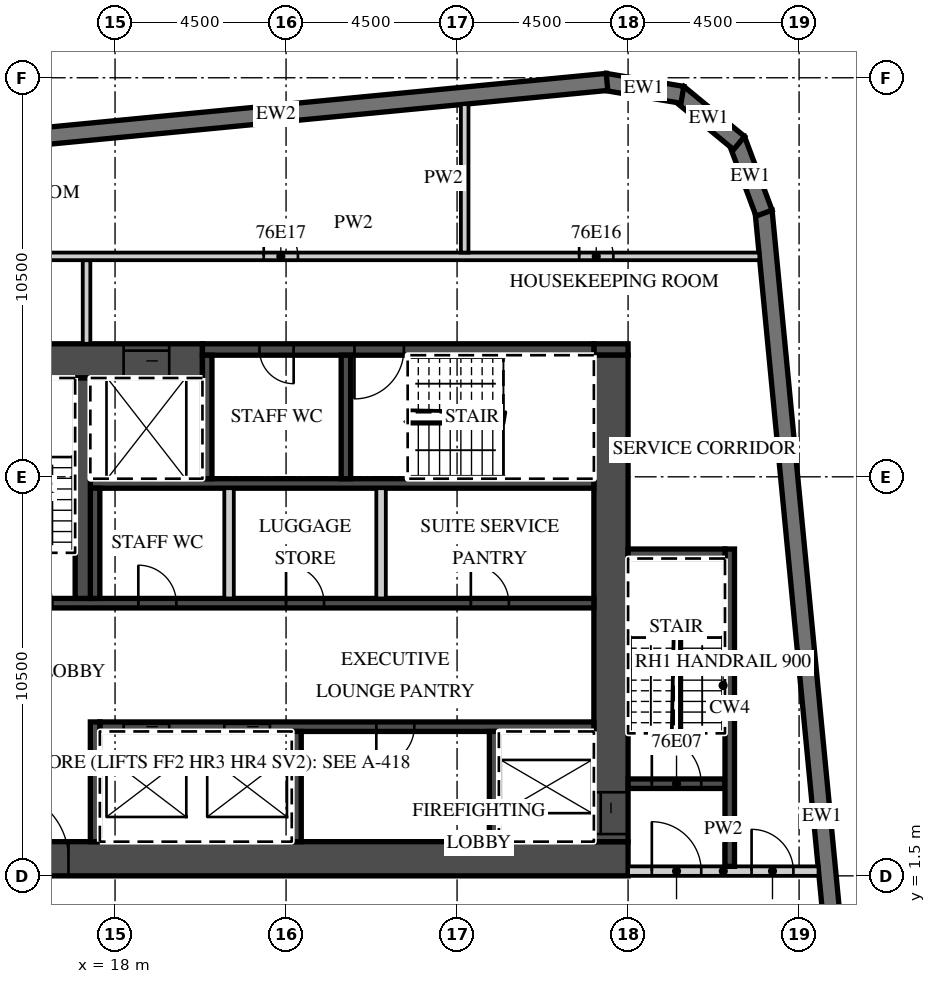
"""IFC4 building model, lengths in metres.
Left out: names, types, materials, properties, quantities, classifications, styles, units other than length and angle.
Written with IfcOpenShell. Run it as: python <this file> out.ifc"""

import sys

from ifc_helpers import new_model, si_unit, direction, frame, frame_2d, origin, place, context, subcontext, project, spatial, polyline, rectangle, outline, extrude, element, fill, save


model = new_model("IFC4")
c1 = context("Model", 3, precision=1e-05, world=origin(), true_north=direction((0.0, 1.0)))
c2 = subcontext(c1, "Body", "Model", "MODEL_VIEW")
j1 = project(units=[si_unit("LENGTHUNIT", "METRE"), si_unit("PLANEANGLEUNIT", "RADIAN")], contexts=[c1])
p1 = place(None, origin())
s1 = spatial("IfcSite", under=j1, at=p1, CompositionType="ELEMENT")
p2 = place(p1, origin())
s2 = spatial("IfcBuilding", under=s1, at=p2, CompositionType="ELEMENT")
p3 = place(p2, frame((0.0, 0.0, 301.5)))
s3 = spatial("IfcBuildingStorey", under=s2, at=p3, CompositionType="ELEMENT", Elevation=301.5)
p4 = place(p3, frame((38.132, -12.858, 0.0), z_axis=(0.0, 0.0, 1.0), x_axis=(-0.095847749461, 0.995396006082, 0.0)))
e1 = element("IfcWall", 1, at=p4, inside=s3, PredefinedType="SOLIDWALL", context=c2, shape_type="SweptSolid", body=[
    extrude(rectangle(XDim=32.0, YDim=0.45, at=frame_2d((16.0, 0.0))), origin(), (0.0, 0.0, 1.0), 3.02),
])
p5 = place(p3, frame((35.078, 18.938, 0.0), z_axis=(0.0, 0.0, 1.0), x_axis=(-0.350192909346, 0.936677599948, 0.0)))
e2 = element("IfcWall", 2, at=p5, inside=s3, PredefinedType="SOLIDWALL", context=c2, shape_type="SweptSolid", body=[
    extrude(outline(polyline([(0.0, -0.225), (2.071, -0.225), (1.95, 0.225), (0.121, 0.225), (0.0, -0.225)])), origin(), (0.0, 0.0, 1.0), 3.02),
])
p6 = place(p3, frame((34.421, 20.782, 0.0), z_axis=(0.0, 0.0, 1.0), x_axis=(-0.771593176315, 0.636116318187, 0.0)))
e3 = element("IfcWall", 3, at=p6, inside=s3, PredefinedType="SOLIDWALL", context=c2, shape_type="SweptSolid", body=[
    extrude(outline(polyline([(0.0, -0.225), (2.071, -0.225), (1.95, 0.225), (0.12, 0.225), (0.0, -0.225)])), origin(), (0.0, 0.0, 1.0), 3.02),
])
p7 = place(p3, frame((32.929, 22.051, 0.0), z_axis=(0.0, 0.0, 1.0), x_axis=(-0.986298144721, 0.164972633245, 0.0)))
e4 = element("IfcWall", 4, at=p7, inside=s3, PredefinedType="SOLIDWALL", context=c2, shape_type="SweptSolid", body=[
    extrude(outline(polyline([(0.0, -0.225), (2.07, -0.225), (1.95, 0.225), (0.121, 0.225), (0.0, -0.225)])), origin(), (0.0, 0.0, 1.0), 3.02),
])
p8 = place(p3, frame((30.946, 22.391, 0.0), z_axis=(0.0, 0.0, 1.0), x_axis=(-0.995396397117, -0.095843688398, 0.0)))
e5 = element("IfcWall", 5, at=p8, inside=s3, PredefinedType="SOLIDWALL", context=c2, shape_type="SweptSolid", body=[
    extrude(rectangle(XDim=17.505, YDim=0.45, at=frame_2d((8.752, 0.0))), origin(), (0.0, 0.0, 1.0), 3.02),
])
p9 = place(p3, frame((13.5, 1.95, 0.0), z_axis=(0.0, 0.0, 1.0), x_axis=(1.0, 0.0, 0.0)))
e6 = element("IfcWall", 6, at=p9, inside=s3, PredefinedType="SHEAR", context=c2, shape_type="SweptSolid", body=[
    extrude(rectangle(XDim=18.0, YDim=0.9, at=frame_2d((9.0, 0.0))), origin(), (0.0, 0.0, 1.0), 3.02),
])
p10 = place(p9, frame((1.475, 0.0, 0.0)))
e7 = element("IfcOpeningElement", 7, at=p10, cuts=e6, PredefinedType="OPENING", context=c2, shape_type="SweptSolid", body=[
    extrude(rectangle(XDim=1.8, YDim=2.1, at=frame_2d((0.9, 1.05))), frame((0.0, 0.46, 0.0), z_axis=(0.0, -1.0, 0.0), x_axis=(1.0, 0.0, 0.0)), (0.0, 0.0, 1.0), 0.92),
])
p11 = place(p3, frame((13.5, 15.05, 0.0), z_axis=(0.0, 0.0, 1.0), x_axis=(1.0, 0.0, 0.0)))
e8 = element("IfcWall", 8, at=p11, inside=s3, PredefinedType="SHEAR", context=c2, shape_type="SweptSolid", body=[
    extrude(rectangle(XDim=6.8, YDim=0.9, at=frame_2d((3.4, 0.0))), origin(), (0.0, 0.0, 1.0), 3.02),
])
p12 = place(p11, frame((4.725, 0.0, 0.0)))
e9 = element("IfcOpeningElement", 9, at=p12, cuts=e8, PredefinedType="OPENING", context=c2, shape_type="SweptSolid", body=[
    extrude(rectangle(XDim=1.2, YDim=2.1, at=frame_2d((0.6, 1.05))), frame((0.0, 0.46, 0.0), z_axis=(0.0, -1.0, 0.0), x_axis=(1.0, 0.0, 0.0)), (0.0, 0.0, 1.0), 0.92),
])
p13 = place(p3, frame((30.6, 15.35, 0.0), z_axis=(0.0, 0.0, 1.0), x_axis=(1.0, 0.0, 0.0)))
e10 = element("IfcWall", 10, at=p13, inside=s3, PredefinedType="SHEAR", context=c2, shape_type="SweptSolid", body=[
    extrude(rectangle(XDim=0.9, YDim=0.3, at=frame_2d((0.45, 0.0))), origin(), (0.0, 0.0, 1.0), 3.02),
])
p14 = place(p3, frame((20.3, 15.35, 0.0), z_axis=(0.0, 0.0, 1.0), x_axis=(1.0, 0.0, 0.0)))
e11 = element("IfcWall", 11, at=p14, inside=s3, PredefinedType="SHEAR", context=c2, shape_type="SweptSolid", body=[
    extrude(rectangle(XDim=10.3, YDim=0.3, at=frame_2d((5.15, 0.0))), origin(), (0.0, 0.0, 1.0), 3.02),
])
p15 = place(p14, frame((4.0, 0.0, 0.0)))
e12 = element("IfcOpeningElement", 12, at=p15, cuts=e11, PredefinedType="OPENING", context=c2, shape_type="SweptSolid", body=[
    extrude(rectangle(XDim=1.3, YDim=2.1, at=frame_2d((0.65, 1.05))), frame((0.0, 0.16, 0.0), z_axis=(0.0, -1.0, 0.0), x_axis=(1.0, 0.0, 0.0)), (0.0, 0.0, 1.0), 0.32),
])
p16 = place(p14, frame((1.5, 0.0, 0.0)))
e13 = element("IfcOpeningElement", 13, at=p16, cuts=e11, PredefinedType="OPENING", context=c2, shape_type="SweptSolid", body=[
    extrude(rectangle(XDim=0.9, YDim=2.1, at=frame_2d((0.45, 1.05))), frame((0.0, 0.16, 0.0), z_axis=(0.0, -1.0, 0.0), x_axis=(1.0, 0.0, 0.0)), (0.0, 0.0, 1.0), 0.32),
])
p17 = place(p3, frame((31.05, 2.4, 0.0), z_axis=(0.0, 0.0, 1.0), x_axis=(0.0, 1.0, 0.0)))
e14 = element("IfcWall", 14, at=p17, inside=s3, PredefinedType="SHEAR", context=c2, shape_type="SweptSolid", body=[
    extrude(rectangle(XDim=12.8, YDim=0.9, at=frame_2d((6.4, 0.0))), origin(), (0.0, 0.0, 1.0), 3.02),
])
p18 = place(p17, frame((0.2, 0.0, 0.0)))
e15 = element("IfcOpeningElement", 15, at=p18, cuts=e14, PredefinedType="OPENING", context=c2, shape_type="SweptSolid", body=[
    extrude(rectangle(XDim=1.1, YDim=2.1, at=frame_2d((0.55, 1.05))), frame((0.0, 0.46, 0.0), z_axis=(0.0, -1.0, 0.0), x_axis=(1.0, 0.0, 0.0)), (0.0, 0.0, 1.0), 0.92),
])
p19 = place(p3, frame((17.6, 5.425, 0.0), z_axis=(0.0, 0.0, 1.0), x_axis=(1.0, 0.0, 0.0)))
e16 = element("IfcWall", 16, at=p19, inside=s3, PredefinedType="SHEAR", context=c2, shape_type="SweptSolid", body=[
    extrude(rectangle(XDim=13.0, YDim=0.25, at=frame_2d((6.5, 0.0))), origin(), (0.0, 0.0, 1.0), 3.02),
])
p20 = place(p19, frame((3.275, 0.0, 0.0)))
e17 = element("IfcOpeningElement", 17, at=p20, cuts=e16, PredefinedType="OPENING", context=c2, shape_type="SweptSolid", body=[
    extrude(rectangle(XDim=1.2, YDim=2.1, at=frame_2d((0.6, 1.05))), frame((0.0, 0.135, 0.0), z_axis=(0.0, -1.0, 0.0), x_axis=(1.0, 0.0, 0.0)), (0.0, 0.0, 1.0), 0.27),
])
p21 = place(p19, frame((0.625, 0.0, 0.0)))
e18 = element("IfcOpeningElement", 18, at=p21, cuts=e16, PredefinedType="OPENING", context=c2, shape_type="SweptSolid", body=[
    extrude(rectangle(XDim=1.2, YDim=2.1, at=frame_2d((0.6, 1.05))), frame((0.0, 0.135, 0.0), z_axis=(0.0, -1.0, 0.0), x_axis=(1.0, 0.0, 0.0)), (0.0, 0.0, 1.0), 0.27),
])
p22 = place(p19, frame((7.275, 0.0, 0.0)))
e19 = element("IfcOpeningElement", 19, at=p22, cuts=e16, PredefinedType="OPENING", context=c2, shape_type="SweptSolid", body=[
    extrude(rectangle(XDim=1.0, YDim=2.1, at=frame_2d((0.5, 1.05))), frame((0.0, 0.135, 0.0), z_axis=(0.0, -1.0, 0.0), x_axis=(1.0, 0.0, 0.0)), (0.0, 0.0, 1.0), 0.27),
])
p23 = place(p3, frame((17.475, 2.4, 0.0), z_axis=(0.0, 0.0, 1.0), x_axis=(0.0, 1.0, 0.0)))
e20 = element("IfcWall", 20, at=p23, inside=s3, PredefinedType="SHEAR", context=c2, shape_type="SweptSolid", body=[
    extrude(rectangle(XDim=3.15, YDim=0.25, at=frame_2d((1.575, 0.0))), origin(), (0.0, 0.0, 1.0), 3.02),
])
for number, where, z_axis, x_axis in (
    (21, (27.975, 2.4, 0.0), (0.0, 0.0, 1.0), (0.0, 1.0, 0.0)),
    (22, (22.775, 2.4, 0.0), (0.0, 0.0, 1.0), (0.0, 1.0, 0.0)),
):
    element("IfcWall", number, at=place(p3, frame(where, z_axis=z_axis, x_axis=x_axis)), inside=s3, PredefinedType="SHEAR", context=c2, shape_type="SweptSolid", body=[
        extrude(rectangle(XDim=2.9, YDim=0.25, at=frame_2d((1.45, 0.0))), origin(), (0.0, 0.0, 1.0), 3.02),
    ])
p24 = place(p3, frame((14.4, 8.675, 0.0), z_axis=(0.0, 0.0, 1.0), x_axis=(1.0, 0.0, 0.0)))
e23 = element("IfcWall", 23, at=p24, inside=s3, PredefinedType="SHEAR", context=c2, shape_type="SweptSolid", body=[
    extrude(rectangle(XDim=16.2, YDim=0.25, at=frame_2d((8.1, 0.0))), origin(), (0.0, 0.0, 1.0), 3.02),
])
p25 = place(p24, frame((0.65, 0.0, 0.0)))
e24 = element("IfcOpeningElement", 24, at=p25, cuts=e23, PredefinedType="OPENING", context=c2, shape_type="SweptSolid", body=[
    extrude(rectangle(XDim=1.3, YDim=2.1, at=frame_2d((0.65, 1.05))), frame((0.0, 0.135, 0.0), z_axis=(0.0, -1.0, 0.0), x_axis=(1.0, 0.0, 0.0)), (0.0, 0.0, 1.0), 0.27),
])
p26 = place(p24, frame((12.962, 0.0, 0.0)))
e25 = element("IfcOpeningElement", 25, at=p26, cuts=e23, PredefinedType="OPENING", context=c2, shape_type="SweptSolid", body=[
    extrude(rectangle(XDim=1.0, YDim=2.1, at=frame_2d((0.5, 1.05))), frame((0.0, 0.135, 0.0), z_axis=(0.0, -1.0, 0.0), x_axis=(1.0, 0.0, 0.0)), (0.0, 0.0, 1.0), 0.27),
])
p27 = place(p24, frame((8.1, 0.0, 0.0)))
e26 = element("IfcOpeningElement", 26, at=p27, cuts=e23, PredefinedType="OPENING", context=c2, shape_type="SweptSolid", body=[
    extrude(rectangle(XDim=1.0, YDim=2.1, at=frame_2d((0.5, 1.05))), frame((0.0, 0.135, 0.0), z_axis=(0.0, -1.0, 0.0), x_axis=(1.0, 0.0, 0.0)), (0.0, 0.0, 1.0), 0.27),
])
p28 = place(p24, frame((4.212, 0.0, 0.0)))
e27 = element("IfcOpeningElement", 27, at=p28, cuts=e23, PredefinedType="OPENING", context=c2, shape_type="SweptSolid", body=[
    extrude(rectangle(XDim=1.0, YDim=2.1, at=frame_2d((0.5, 1.05))), frame((0.0, 0.135, 0.0), z_axis=(0.0, -1.0, 0.0), x_axis=(1.0, 0.0, 0.0)), (0.0, 0.0, 1.0), 0.27),
])
p29 = place(p3, frame((17.35, 11.825, 0.0), z_axis=(0.0, 0.0, 1.0), x_axis=(1.0, 0.0, 0.0)))
e28 = element("IfcWall", 28, at=p29, inside=s3, PredefinedType="SHEAR", context=c2, shape_type="SweptSolid", body=[
    extrude(rectangle(XDim=13.25, YDim=0.25, at=frame_2d((6.625, 0.0))), origin(), (0.0, 0.0, 1.0), 3.02),
])
p30 = place(p3, frame((17.475, 8.8, 0.0), z_axis=(0.0, 0.0, 1.0), x_axis=(0.0, 1.0, 0.0)))
e29 = element("IfcWall", 29, at=p30, inside=s3, PredefinedType="SHEAR", context=c2, shape_type="SweptSolid", body=[
    extrude(rectangle(XDim=2.9, YDim=0.25, at=frame_2d((1.45, 0.0))), origin(), (0.0, 0.0, 1.0), 3.02),
])
for number, where, z_axis, x_axis in (
    (30, (25.0, 8.8, 0.0), (0.0, 0.0, 1.0), (0.0, 1.0, 0.0)),
    (31, (21.0, 8.8, 0.0), (0.0, 0.0, 1.0), (0.0, 1.0, 0.0)),
):
    element("IfcWall", number, at=place(p3, frame(where, z_axis=z_axis, x_axis=x_axis)), inside=s3, PredefinedType="PARTITIONING", context=c2, shape_type="SweptSolid", body=[
        extrude(rectangle(XDim=2.9, YDim=0.25, at=frame_2d((1.45, 0.0))), origin(), (0.0, 0.0, 1.0), 3.02),
    ])
p31 = place(p3, frame((17.15, 8.8, 0.0), z_axis=(0.0, 0.0, 1.0), x_axis=(0.0, 1.0, 0.0)))
e32 = element("IfcWall", 32, at=p31, inside=s3, PredefinedType="SHEAR", context=c2, shape_type="SweptSolid", body=[
    extrude(rectangle(XDim=5.8, YDim=0.4, at=frame_2d((2.9, 0.0))), origin(), (0.0, 0.0, 1.0), 3.02),
])
for number, where, z_axis, x_axis in (
    (33, (20.425, 11.95, 0.0), (0.0, 0.0, 1.0), (0.0, 1.0, 0.0)),
    (34, (24.075, 11.95, 0.0), (0.0, 0.0, 1.0), (0.0, 1.0, 0.0)),
):
    element("IfcWall", number, at=place(p3, frame(where, z_axis=z_axis, x_axis=x_axis)), inside=s3, PredefinedType="SHEAR", context=c2, shape_type="SweptSolid", body=[
        extrude(rectangle(XDim=3.25, YDim=0.25, at=frame_2d((1.625, 0.0))), origin(), (0.0, 0.0, 1.0), 3.02),
    ])
p32 = place(p3, frame((31.5, 1.625, 0.0), z_axis=(0.0, 0.0, 1.0), x_axis=(1.0, 0.0, 0.0)))
e35 = element("IfcWall", 35, at=p32, inside=s3, PredefinedType="PARTITIONING", context=c2, shape_type="SweptSolid", body=[
    extrude(rectangle(XDim=5.012, YDim=0.25, at=frame_2d((2.506, 0.0))), origin(), (0.0, 0.0, 1.0), 3.02),
])
p33 = place(p32, frame((0.625, 0.0, 0.0)))
e36 = element("IfcOpeningElement", 36, at=p33, cuts=e35, PredefinedType="OPENING", context=c2, shape_type="SweptSolid", body=[
    extrude(rectangle(XDim=1.3, YDim=2.1, at=frame_2d((0.65, 1.05))), frame((0.0, 0.135, 0.0), z_axis=(0.0, -1.0, 0.0), x_axis=(1.0, 0.0, 0.0)), (0.0, 0.0, 1.0), 0.27),
])
p34 = place(p32, frame((3.25, 0.0, 0.0)))
e37 = element("IfcOpeningElement", 37, at=p34, cuts=e35, PredefinedType="OPENING", context=c2, shape_type="SweptSolid", body=[
    extrude(rectangle(XDim=1.1, YDim=2.1, at=frame_2d((0.55, 1.05))), frame((0.0, 0.135, 0.0), z_axis=(0.0, -1.0, 0.0), x_axis=(1.0, 0.0, 0.0)), (0.0, 0.0, 1.0), 0.27),
])
p35 = place(p3, frame((31.5, 3.925, 0.0), z_axis=(0.0, 0.0, 1.0), x_axis=(1.0, 0.0, 0.0)))
e38 = element("IfcWall", 38, at=p35, inside=s3, PredefinedType="SHEAR", context=c2, shape_type="SweptSolid", body=[
    extrude(rectangle(XDim=2.55, YDim=0.25, at=frame_2d((1.275, 0.0))), origin(), (0.0, 0.0, 1.0), 3.02),
])
p36 = place(p35, frame((0.625, 0.0, 0.0)))
e39 = element("IfcOpeningElement", 39, at=p36, cuts=e38, PredefinedType="OPENING", context=c2, shape_type="SweptSolid", body=[
    extrude(rectangle(XDim=1.3, YDim=2.1, at=frame_2d((0.65, 1.05))), frame((0.0, 0.135, 0.0), z_axis=(0.0, -1.0, 0.0), x_axis=(1.0, 0.0, 0.0)), (0.0, 0.0, 1.0), 0.27),
])
p37 = place(p3, frame((34.175, 1.75, 0.0), z_axis=(0.0, 0.0, 1.0), x_axis=(0.0, 1.0, 0.0)))
e40 = element("IfcWall", 40, at=p37, inside=s3, PredefinedType="SHEAR", context=c2, shape_type="SweptSolid", body=[
    extrude(rectangle(XDim=8.35, YDim=0.25, at=frame_2d((4.175, 0.0))), origin(), (0.0, 0.0, 1.0), 3.02),
])
p38 = place(p3, frame((31.5, 9.975, 0.0), z_axis=(0.0, 0.0, 1.0), x_axis=(1.0, 0.0, 0.0)))
e41 = element("IfcWall", 41, at=p38, inside=s3, PredefinedType="SHEAR", context=c2, shape_type="SweptSolid", body=[
    extrude(rectangle(XDim=2.55, YDim=0.25, at=frame_2d((1.275, 0.0))), origin(), (0.0, 0.0, 1.0), 3.02),
])
p39 = place(p3, frame((17.25, 15.5, 0.0), z_axis=(0.0, 0.0, 1.0), x_axis=(0.0, 1.0, 0.0)))
e42 = element("IfcWall", 42, at=p39, inside=s3, PredefinedType="PARTITIONING", context=c2, shape_type="SweptSolid", body=[
    extrude(rectangle(XDim=2.2, YDim=0.2, at=frame_2d((1.1, 0.0))), origin(), (0.0, 0.0, 1.0), 3.02),
])
p40 = place(p3, frame((13.6, 17.8, 0.0), z_axis=(0.0, 0.0, 1.0), x_axis=(1.0, 0.0, 0.0)))
e43 = element("IfcWall", 43, at=p40, inside=s3, PredefinedType="PARTITIONING", context=c2, shape_type="SweptSolid", body=[
    extrude(rectangle(XDim=21.354, YDim=0.2, at=frame_2d((10.677, 0.0))), origin(), (0.0, 0.0, 1.0), 3.02),
])
p41 = place(p40, frame((16.613, 0.0, 0.0)))
e44 = element("IfcOpeningElement", 44, at=p41, cuts=e43, PredefinedType="OPENING", context=c2, shape_type="SweptSolid", body=[
    extrude(rectangle(XDim=0.9, YDim=2.1, at=frame_2d((0.45, 1.05))), frame((0.0, 0.11, 0.0), z_axis=(0.0, -1.0, 0.0), x_axis=(1.0, 0.0, 0.0)), (0.0, 0.0, 1.0), 0.22),
])
p42 = place(p40, frame((8.312, 0.0, 0.0)))
e45 = element("IfcOpeningElement", 45, at=p42, cuts=e43, PredefinedType="OPENING", context=c2, shape_type="SweptSolid", body=[
    extrude(rectangle(XDim=0.9, YDim=2.1, at=frame_2d((0.45, 1.05))), frame((0.0, 0.11, 0.0), z_axis=(0.0, -1.0, 0.0), x_axis=(1.0, 0.0, 0.0)), (0.0, 0.0, 1.0), 0.22),
])
p43 = place(p3, frame((27.2, 17.9, 0.0), z_axis=(0.0, 0.0, 1.0), x_axis=(0.0, 1.0, 0.0)))
e46 = element("IfcWall", 46, at=p43, inside=s3, PredefinedType="PARTITIONING", context=c2, shape_type="SweptSolid", body=[
    extrude(rectangle(XDim=3.905, YDim=0.2, at=frame_2d((1.953, 0.0))), origin(), (0.0, 0.0, 1.0), 3.02),
])
p44 = place(p20, origin())
e47 = element("IfcDoor", 47, at=p44, inside=s3, OperationType="SLIDING_TO_RIGHT", PredefinedType="DOOR", context=c2, shape_type="SweptSolid", body=[
    extrude(rectangle(XDim=1.2, YDim=2.1, at=frame_2d((0.6, 1.05))), frame((0.0, 0.025, 0.0), z_axis=(0.0, -1.0, 0.0), x_axis=(1.0, 0.0, 0.0)), (0.0, 0.0, 1.0), 0.05),
])
fill(e17, e47)
p45 = place(p21, origin())
e48 = element("IfcDoor", 48, at=p45, inside=s3, OperationType="SLIDING_TO_LEFT", PredefinedType="DOOR", context=c2, shape_type="SweptSolid", body=[
    extrude(rectangle(XDim=1.2, YDim=2.1, at=frame_2d((0.6, 1.05))), frame((0.0, 0.025, 0.0), z_axis=(0.0, -1.0, 0.0), x_axis=(1.0, 0.0, 0.0)), (0.0, 0.0, 1.0), 0.05),
])
fill(e18, e48)
p46 = place(p12, origin())
e49 = element("IfcDoor", 49, at=p46, inside=s3, OperationType="SLIDING_TO_LEFT", PredefinedType="DOOR", context=c2, shape_type="SweptSolid", body=[
    extrude(rectangle(XDim=1.2, YDim=2.1, at=frame_2d((0.6, 1.05))), frame((0.0, 0.025, 0.0), z_axis=(0.0, -1.0, 0.0), x_axis=(1.0, 0.0, 0.0)), (0.0, 0.0, 1.0), 0.05),
])
fill(e9, e49)
p47 = place(p18, origin())
e50 = element("IfcDoor", 50, at=p47, inside=s3, OperationType="SLIDING_TO_LEFT", PredefinedType="DOOR", context=c2, shape_type="SweptSolid", body=[
    extrude(rectangle(XDim=1.1, YDim=2.1, at=frame_2d((0.55, 1.05))), frame((0.0, 0.025, 0.0), z_axis=(0.0, -1.0, 0.0), x_axis=(1.0, 0.0, 0.0)), (0.0, 0.0, 1.0), 0.05),
])
fill(e15, e50)
p48 = place(p10, origin())
e51 = element("IfcDoor", 51, at=p48, inside=s3, OperationType="DOUBLE_DOOR_DOUBLE_SWING", PredefinedType="DOOR", context=c2, shape_type="SweptSolid", body=[
    extrude(rectangle(XDim=1.8, YDim=2.1, at=frame_2d((0.9, 1.05))), frame((0.0, 0.025, 0.0), z_axis=(0.0, -1.0, 0.0), x_axis=(1.0, 0.0, 0.0)), (0.0, 0.0, 1.0), 0.05),
])
fill(e7, e51)
p49 = place(p33, origin())
e52 = element("IfcDoor", 52, at=p49, inside=s3, OperationType="SINGLE_SWING_LEFT", PredefinedType="DOOR", context=c2, shape_type="SweptSolid", body=[
    extrude(rectangle(XDim=1.3, YDim=2.1, at=frame_2d((0.65, 1.05))), frame((0.0, 0.025, 0.0), z_axis=(0.0, -1.0, 0.0), x_axis=(1.0, 0.0, 0.0)), (0.0, 0.0, 1.0), 0.05),
])
fill(e36, e52)
p50 = place(p36, origin())
e53 = element("IfcDoor", 53, at=p50, inside=s3, OperationType="SINGLE_SWING_LEFT", PredefinedType="DOOR", context=c2, shape_type="SweptSolid", body=[
    extrude(rectangle(XDim=1.3, YDim=2.1, at=frame_2d((0.65, 1.05))), frame((0.0, 0.025, 0.0), z_axis=(0.0, -1.0, 0.0), x_axis=(1.0, 0.0, 0.0)), (0.0, 0.0, 1.0), 0.05),
])
fill(e39, e53)
p51 = place(p34, origin())
e54 = element("IfcDoor", 54, at=p51, inside=s3, OperationType="SINGLE_SWING_LEFT", PredefinedType="DOOR", context=c2, shape_type="SweptSolid", body=[
    extrude(rectangle(XDim=1.1, YDim=2.1, at=frame_2d((0.55, 1.05))), frame((0.0, 0.025, 0.0), z_axis=(0.0, -1.0, 0.0), x_axis=(1.0, 0.0, 0.0)), (0.0, 0.0, 1.0), 0.05),
])
fill(e37, e54)
p52 = place(p15, origin())
e55 = element("IfcDoor", 55, at=p52, inside=s3, OperationType="SINGLE_SWING_LEFT", PredefinedType="DOOR", context=c2, shape_type="SweptSolid", body=[
    extrude(rectangle(XDim=1.3, YDim=2.1, at=frame_2d((0.65, 1.05))), frame((0.0, 0.025, 0.0), z_axis=(0.0, -1.0, 0.0), x_axis=(1.0, 0.0, 0.0)), (0.0, 0.0, 1.0), 0.05),
])
fill(e12, e55)
p53 = place(p16, origin())
e56 = element("IfcDoor", 56, at=p53, inside=s3, OperationType="SINGLE_SWING_RIGHT", PredefinedType="DOOR", context=c2, shape_type="SweptSolid", body=[
    extrude(rectangle(XDim=0.9, YDim=2.1, at=frame_2d((0.45, 1.05))), frame((0.0, 0.025, 0.0), z_axis=(0.0, -1.0, 0.0), x_axis=(1.0, 0.0, 0.0)), (0.0, 0.0, 1.0), 0.05),
])
fill(e13, e56)
p54 = place(p26, origin())
e57 = element("IfcDoor", 57, at=p54, inside=s3, OperationType="SINGLE_SWING_LEFT", PredefinedType="DOOR", context=c2, shape_type="SweptSolid", body=[
    extrude(rectangle(XDim=1.0, YDim=2.1, at=frame_2d((0.5, 1.05))), frame((0.0, 0.025, 0.0), z_axis=(0.0, -1.0, 0.0), x_axis=(1.0, 0.0, 0.0)), (0.0, 0.0, 1.0), 0.05),
])
fill(e25, e57)
p55 = place(p27, origin())
e58 = element("IfcDoor", 58, at=p55, inside=s3, OperationType="SINGLE_SWING_LEFT", PredefinedType="DOOR", context=c2, shape_type="SweptSolid", body=[
    extrude(rectangle(XDim=1.0, YDim=2.1, at=frame_2d((0.5, 1.05))), frame((0.0, 0.025, 0.0), z_axis=(0.0, -1.0, 0.0), x_axis=(1.0, 0.0, 0.0)), (0.0, 0.0, 1.0), 0.05),
])
fill(e26, e58)
p56 = place(p28, origin())
e59 = element("IfcDoor", 59, at=p56, inside=s3, OperationType="SINGLE_SWING_LEFT", PredefinedType="DOOR", context=c2, shape_type="SweptSolid", body=[
    extrude(rectangle(XDim=1.0, YDim=2.1, at=frame_2d((0.5, 1.05))), frame((0.0, 0.025, 0.0), z_axis=(0.0, -1.0, 0.0), x_axis=(1.0, 0.0, 0.0)), (0.0, 0.0, 1.0), 0.05),
])
fill(e27, e59)
p57 = place(p22, origin())
e60 = element("IfcDoor", 60, at=p57, inside=s3, OperationType="SINGLE_SWING_LEFT", PredefinedType="DOOR", context=c2, shape_type="SweptSolid", body=[
    extrude(rectangle(XDim=1.0, YDim=2.1, at=frame_2d((0.5, 1.05))), frame((0.0, 0.025, 0.0), z_axis=(0.0, -1.0, 0.0), x_axis=(1.0, 0.0, 0.0)), (0.0, 0.0, 1.0), 0.05),
])
fill(e19, e60)
p58 = place(p41, origin())
e61 = element("IfcDoor", 61, at=p58, inside=s3, OperationType="SINGLE_SWING_LEFT", PredefinedType="DOOR", context=c2, shape_type="SweptSolid", body=[
    extrude(rectangle(XDim=0.9, YDim=2.1, at=frame_2d((0.45, 1.05))), frame((0.0, 0.025, 0.0), z_axis=(0.0, -1.0, 0.0), x_axis=(1.0, 0.0, 0.0)), (0.0, 0.0, 1.0), 0.05),
])
fill(e44, e61)
p59 = place(p42, origin())
e62 = element("IfcDoor", 62, at=p59, inside=s3, OperationType="SINGLE_SWING_LEFT", PredefinedType="DOOR", context=c2, shape_type="SweptSolid", body=[
    extrude(rectangle(XDim=0.9, YDim=2.1, at=frame_2d((0.45, 1.05))), frame((0.0, 0.025, 0.0), z_axis=(0.0, -1.0, 0.0), x_axis=(1.0, 0.0, 0.0)), (0.0, 0.0, 1.0), 0.05),
])
fill(e45, e62)
save(model, sys.argv[1])
